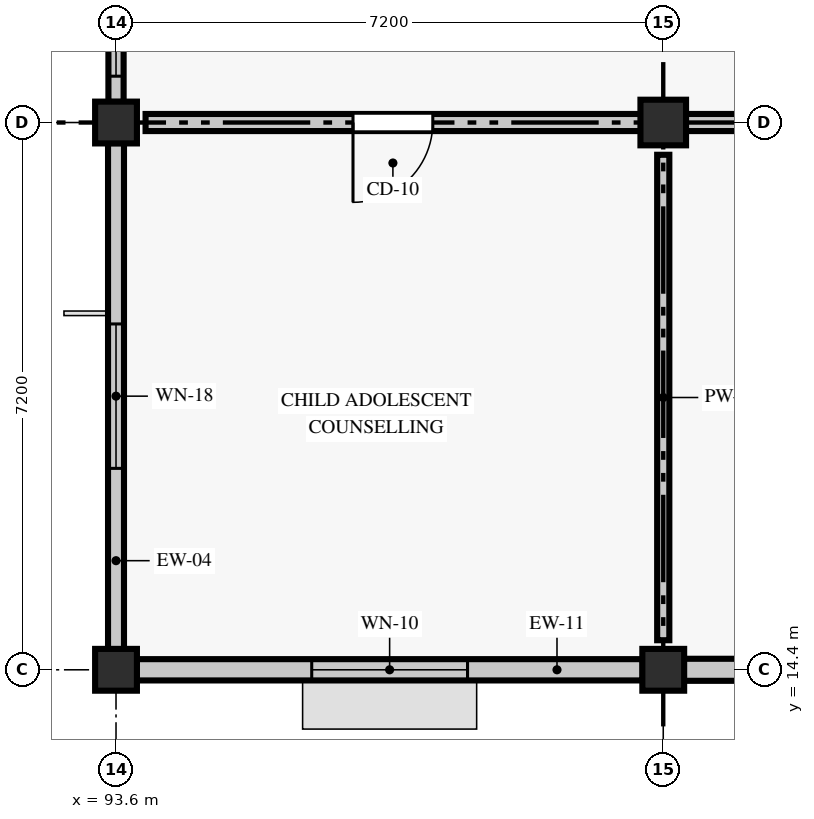
"""IFC4 building model, lengths in metres.
Left out: names, types, materials, properties, quantities, classifications, styles, units other than length and angle.
Written with IfcOpenShell. Run it as: python <this file> out.ifc"""

import sys

from ifc_helpers import new_model, si_unit, direction, frame, frame_2d, origin, origin_2d, place, context, subcontext, project, spatial, rectangle, extrude, element, fill, save


model = new_model("IFC4")
c1 = context("Model", 3, precision=1e-05, world=origin(), true_north=direction((0.0, 1.0)))
c2 = subcontext(c1, "Body", "Model", "MODEL_VIEW")
j1 = project(units=[si_unit("LENGTHUNIT", "METRE"), si_unit("PLANEANGLEUNIT", "RADIAN")], contexts=[c1])
p1 = place(None, origin())
s1 = spatial("IfcSite", under=j1, at=p1, CompositionType="ELEMENT")
p2 = place(p1, origin())
s2 = spatial("IfcBuilding", under=s1, at=p2, CompositionType="ELEMENT")
p3 = place(p2, frame((0.0, 0.0, 13.8)))
s3 = spatial("IfcBuildingStorey", under=s2, at=p3, CompositionType="ELEMENT", Elevation=13.8)
for number, where, z_axis, x_axis in (
    (1, (93.6, 14.4, 0.0), (0.0, 0.0, 1.0), (1.0, 0.0, 0.0)),
    (2, (93.6, 21.6, 0.0), (0.0, 0.0, 1.0), (1.0, 0.0, 0.0)),
    (3, (100.8, 14.4, 0.0), (0.0, 0.0, 1.0), (1.0, 0.0, 0.0)),
):
    element("IfcColumn", number, at=place(p3, frame(where, z_axis=z_axis, x_axis=x_axis)), inside=s3, PredefinedType="COLUMN", context=c2, shape_type="SweptSolid", body=[
        extrude(rectangle(XDim=0.55, YDim=0.55, at=origin_2d()), origin(), (0.0, 0.0, 1.0), 3.88),
    ])
p4 = place(p3, frame((100.8, 21.6, 0.0), z_axis=(0.0, 0.0, 1.0), x_axis=(1.0, 0.0, 0.0)))
e4 = element("IfcColumn", 4, at=p4, inside=s3, PredefinedType="COLUMN", context=c2, shape_type="SweptSolid", body=[
    extrude(rectangle(XDim=0.6, YDim=0.6, at=origin_2d()), origin(), (0.0, 0.0, 1.0), 3.88),
])
p5 = place(p3, frame((93.871, 14.4, 0.0), z_axis=(0.0, 0.0, 1.0), x_axis=(1.0, 0.0, 0.0)))
e5 = element("IfcWall", 5, at=p5, inside=s3, PredefinedType="STANDARD", context=c2, shape_type="SweptSolid", body=[
    extrude(rectangle(XDim=6.658, YDim=0.28, at=frame_2d((3.329, 0.0))), origin(), (0.0, 0.0, 1.0), 3.23),
])
p6 = place(p5, frame((2.304, 0.0, 0.9)))
e6 = element("IfcOpeningElement", 6, at=p6, cuts=e5, PredefinedType="OPENING", context=c2, shape_type="SweptSolid", body=[
    extrude(rectangle(XDim=2.05, YDim=1.3, at=frame_2d((1.025, 0.65))), frame((0.0, 0.15, 0.0), z_axis=(0.0, -1.0, 0.0), x_axis=(1.0, 0.0, 0.0)), (0.0, 0.0, 1.0), 0.3),
])
p7 = place(p3, frame((101.071, 14.4, 0.0), z_axis=(0.0, 0.0, 1.0), x_axis=(1.0, 0.0, 0.0)))
e7 = element("IfcWall", 7, at=p7, inside=s3, PredefinedType="STANDARD", context=c2, shape_type="SweptSolid", body=[
    extrude(rectangle(XDim=6.658, YDim=0.29, at=frame_2d((3.329, 0.0))), origin(), (0.0, 0.0, 1.0), 3.23),
])
p8 = place(p7, frame((2.779, 0.0, 0.9)))
e8 = element("IfcOpeningElement", 8, at=p8, cuts=e7, PredefinedType="OPENING", context=c2, shape_type="SweptSolid", body=[
    extrude(rectangle(XDim=1.1, YDim=1.42, at=frame_2d((0.55, 0.71))), frame((0.0, 0.155, 0.0), z_axis=(0.0, -1.0, 0.0), x_axis=(1.0, 0.0, 0.0)), (0.0, 0.0, 1.0), 0.31),
])
p9 = place(p3, frame((93.6, 24.298, 0.0), z_axis=(0.0, 0.0, 1.0), x_axis=(0.0, -1.0, 0.0)))
e9 = element("IfcWall", 9, at=p9, inside=s3, PredefinedType="STANDARD", context=c2, shape_type="SweptSolid", body=[
    extrude(rectangle(XDim=2.427, YDim=0.2, at=frame_2d((1.213, 0.0))), origin(), (0.0, 0.0, 1.0), 3.88),
])
p10 = place(p9, frame((0.338, 0.0, 0.9)))
e10 = element("IfcOpeningElement", 10, at=p10, cuts=e9, PredefinedType="OPENING", context=c2, shape_type="SweptSolid", body=[
    extrude(rectangle(XDim=1.75, YDim=1.42, at=frame_2d((0.875, 0.71))), frame((0.0, 0.11, 0.0), z_axis=(0.0, -1.0, 0.0), x_axis=(1.0, 0.0, 0.0)), (0.0, 0.0, 1.0), 0.22),
])
p11 = place(p3, frame((93.6, 21.329, 0.0), z_axis=(0.0, 0.0, 1.0), x_axis=(0.0, -1.0, 0.0)))
e11 = element("IfcWall", 11, at=p11, inside=s3, PredefinedType="STANDARD", context=c2, shape_type="SweptSolid", body=[
    extrude(rectangle(XDim=6.658, YDim=0.21, at=frame_2d((3.329, 0.0))), origin(), (0.0, 0.0, 1.0), 3.23),
])
p12 = place(p11, frame((2.379, 0.0, 0.9)))
e12 = element("IfcOpeningElement", 12, at=p12, cuts=e11, PredefinedType="OPENING", context=c2, shape_type="SweptSolid", body=[
    extrude(rectangle(XDim=1.9, YDim=1.42, at=frame_2d((0.95, 0.71))), frame((0.0, 0.115, 0.0), z_axis=(0.0, -1.0, 0.0), x_axis=(1.0, 0.0, 0.0)), (0.0, 0.0, 1.0), 0.23),
])
p13 = place(p3, frame((93.989, 21.6, 0.0), z_axis=(0.0, 0.0, 1.0), x_axis=(1.0, 0.0, 0.0)))
e13 = element("IfcWall", 13, at=p13, inside=s3, PredefinedType="PARTITIONING", context=c2, shape_type="SweptSolid", body=[
    extrude(rectangle(XDim=28.022, YDim=0.225, at=frame_2d((14.011, 0.0))), origin(), (0.0, 0.0, 1.0), 3.18),
])
p14 = place(p13, frame((2.729, 0.0, 0.0)))
e14 = element("IfcOpeningElement", 14, at=p14, cuts=e13, PredefinedType="OPENING", context=c2, shape_type="SweptSolid", body=[
    extrude(rectangle(XDim=1.05, YDim=2.13, at=frame_2d((0.525, 1.065))), frame((0.0, 0.123, 0.0), z_axis=(0.0, -1.0, 0.0), x_axis=(1.0, 0.0, 0.0)), (0.0, 0.0, 1.0), 0.245),
])
p15 = place(p13, frame((7.791, 0.0, 0.0)))
e15 = element("IfcOpeningElement", 15, at=p15, cuts=e13, PredefinedType="OPENING", context=c2, shape_type="SweptSolid", body=[
    extrude(rectangle(XDim=0.92, YDim=2.18, at=frame_2d((0.46, 1.09))), frame((0.0, 0.123, 0.0), z_axis=(0.0, -1.0, 0.0), x_axis=(1.0, 0.0, 0.0)), (0.0, 0.0, 1.0), 0.245),
])
p16 = place(p13, frame((9.991, 0.0, 0.0)))
e16 = element("IfcOpeningElement", 16, at=p16, cuts=e13, PredefinedType="OPENING", context=c2, shape_type="SweptSolid", body=[
    extrude(rectangle(XDim=0.94, YDim=2.08, at=frame_2d((0.47, 1.04))), frame((0.0, 0.123, 0.0), z_axis=(0.0, -1.0, 0.0), x_axis=(1.0, 0.0, 0.0)), (0.0, 0.0, 1.0), 0.245),
])
p17 = place(p13, frame((12.281, 0.0, 0.0)))
e17 = element("IfcOpeningElement", 17, at=p17, cuts=e13, PredefinedType="OPENING", context=c2, shape_type="SweptSolid", body=[
    extrude(rectangle(XDim=0.9, YDim=2.08, at=frame_2d((0.45, 1.04))), frame((0.0, 0.123, 0.0), z_axis=(0.0, -1.0, 0.0), x_axis=(1.0, 0.0, 0.0)), (0.0, 0.0, 1.0), 0.245),
])
p18 = place(p13, frame((16.756, 0.0, 0.0)))
e18 = element("IfcOpeningElement", 18, at=p18, cuts=e13, PredefinedType="OPENING", context=c2, shape_type="SweptSolid", body=[
    extrude(rectangle(XDim=0.97, YDim=2.18, at=frame_2d((0.485, 1.09))), frame((0.0, 0.123, 0.0), z_axis=(0.0, -1.0, 0.0), x_axis=(1.0, 0.0, 0.0)), (0.0, 0.0, 1.0), 0.245),
])
p19 = place(p13, frame((24.114, 0.0, 0.0)))
e19 = element("IfcOpeningElement", 19, at=p19, cuts=e13, PredefinedType="OPENING", context=c2, shape_type="SweptSolid", body=[
    extrude(rectangle(XDim=1.03, YDim=2.18, at=frame_2d((0.515, 1.09))), frame((0.0, 0.123, 0.0), z_axis=(0.0, -1.0, 0.0), x_axis=(1.0, 0.0, 0.0)), (0.0, 0.0, 1.0), 0.245),
])
p20 = place(p3, frame((100.8, 14.789, 0.0), z_axis=(0.0, 0.0, 1.0), x_axis=(0.0, 1.0, 0.0)))
e20 = element("IfcWall", 20, at=p20, inside=s3, PredefinedType="PARTITIONING", context=c2, shape_type="SweptSolid", body=[
    extrude(rectangle(XDim=6.387, YDim=0.16, at=frame_2d((3.193, 0.0))), origin(), (0.0, 0.0, 1.0), 3.33),
])
p21 = place(p6, origin())
e21 = element("IfcWindow", 21, at=p21, inside=s3, PartitioningType="SINGLE_PANEL", PredefinedType="WINDOW", context=c2, shape_type="SweptSolid", body=[
    extrude(rectangle(XDim=2.05, YDim=1.3, at=frame_2d((1.025, 0.65))), frame((0.0, 0.03, 0.0), z_axis=(0.0, -1.0, 0.0), x_axis=(1.0, 0.0, 0.0)), (0.0, 0.0, 1.0), 0.06),
])
fill(e6, e21)
p22 = place(p10, origin())
e22 = element("IfcWindow", 22, at=p22, inside=s3, PartitioningType="SINGLE_PANEL", PredefinedType="WINDOW", context=c2, shape_type="SweptSolid", body=[
    extrude(rectangle(XDim=1.75, YDim=1.42, at=frame_2d((0.875, 0.71))), frame((0.0, 0.03, 0.0), z_axis=(0.0, -1.0, 0.0), x_axis=(1.0, 0.0, 0.0)), (0.0, 0.0, 1.0), 0.06),
])
fill(e10, e22)
p23 = place(p12, origin())
e23 = element("IfcWindow", 23, at=p23, inside=s3, PartitioningType="SINGLE_PANEL", PredefinedType="WINDOW", context=c2, shape_type="SweptSolid", body=[
    extrude(rectangle(XDim=1.9, YDim=1.42, at=frame_2d((0.95, 0.71))), frame((0.0, 0.03, 0.0), z_axis=(0.0, -1.0, 0.0), x_axis=(1.0, 0.0, 0.0)), (0.0, 0.0, 1.0), 0.06),
])
fill(e12, e23)
p24 = place(p14, frame((1.05, 0.0, 0.0), z_axis=(0.0, 0.0, 1.0), x_axis=(-1.0, 0.0, 0.0)))
e24 = element("IfcDoor", 24, at=p24, inside=s3, OperationType="SINGLE_SWING_RIGHT", PredefinedType="DOOR", context=c2, shape_type="SweptSolid", body=[
    extrude(rectangle(XDim=1.05, YDim=2.13, at=frame_2d((0.525, 1.065))), frame((0.0, 0.025, 0.0), z_axis=(0.0, -1.0, 0.0), x_axis=(1.0, 0.0, 0.0)), (0.0, 0.0, 1.0), 0.05),
])
fill(e14, e24)
save(model, sys.argv[1])
